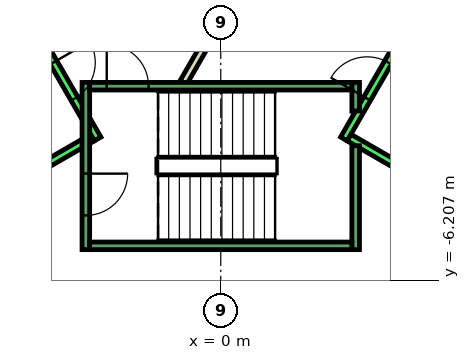
"""IFC4 building model, lengths in metres.
Left out: names, types, materials, properties, quantities, classifications, styles, units other than length and angle.
Written with IfcOpenShell. Run it as: python <this file> out.ifc"""

import sys

from ifc_helpers import new_model, si_unit, direction, frame, frame_2d, origin, place, context, subcontext, project, spatial, rectangle, extrude, element, fill, save


model = new_model("IFC4")
c1 = context("Model", 3, precision=1e-05, world=origin(), true_north=direction((0.0, 1.0)))
c2 = subcontext(c1, "Body", "Model", "MODEL_VIEW")
j1 = project(units=[si_unit("LENGTHUNIT", "METRE"), si_unit("PLANEANGLEUNIT", "RADIAN")], contexts=[c1])
p1 = place(None, origin())
s1 = spatial("IfcSite", under=j1, at=p1, CompositionType="ELEMENT")
p2 = place(p1, origin())
s2 = spatial("IfcBuilding", under=s1, at=p2, CompositionType="ELEMENT")
p3 = place(p2, frame((0.0, 0.0, 223.4)))
s3 = spatial("IfcBuildingStorey", under=s2, at=p3, CompositionType="ELEMENT", Elevation=223.4)
p4 = place(p3, frame((-0.982, -1.0, 0.0), z_axis=(0.0, 0.0, 1.0), x_axis=(0.50024047865, 0.865886518847, 0.0)))
e1 = element("IfcWall", 1, at=p4, inside=s3, PredefinedType="PARTITIONING", context=c2, shape_type="SweptSolid", body=[
    extrude(rectangle(XDim=1.863, YDim=0.2, at=frame_2d((0.931, 0.0))), origin(), (0.0, 0.0, 1.0), 3.8),
])
p5 = place(p3, frame((-5.94, 2.188, 0.0), z_axis=(0.0, 0.0, 1.0), x_axis=(0.500034260056, -0.866005622828, 0.0)))
e2 = element("IfcWall", 2, at=p5, inside=s3, PredefinedType="STANDARD", context=c2, shape_type="SweptSolid", body=[
    extrude(rectangle(XDim=5.399, YDim=0.2, at=frame_2d((2.7, 0.0))), origin(), (0.0, 0.0, 1.0), 3.8),
])
p6 = place(p5, frame((3.075, 0.0, 0.0)))
e3 = element("IfcOpeningElement", 3, at=p6, cuts=e2, PredefinedType="OPENING", context=c2, shape_type="SweptSolid", body=[
    extrude(rectangle(XDim=1.1, YDim=2.1, at=frame_2d((0.55, 1.05))), frame((0.0, 0.11, 0.0), z_axis=(0.0, -1.0, 0.0), x_axis=(1.0, 0.0, 0.0)), (0.0, 0.0, 1.0), 0.22),
])
p7 = place(p5, frame((1.225, 0.0, 0.0)))
e4 = element("IfcOpeningElement", 4, at=p7, cuts=e2, PredefinedType="OPENING", context=c2, shape_type="SweptSolid", body=[
    extrude(rectangle(XDim=1.1, YDim=2.1, at=frame_2d((0.55, 1.05))), frame((0.0, 0.11, 0.0), z_axis=(0.0, -1.0, 0.0), x_axis=(1.0, 0.0, 0.0)), (0.0, 0.0, 1.0), 0.22),
])
p8 = place(p3, frame((-3.377, -2.452, 0.0), z_axis=(0.0, 0.0, 1.0), x_axis=(-0.865955154139, -0.50012165622, 0.0)))
e5 = element("IfcWall", 5, at=p8, inside=s3, PredefinedType="STANDARD", context=c2, shape_type="SweptSolid", body=[
    extrude(rectangle(XDim=2.4, YDim=0.2, at=frame_2d((1.2, 0.0))), origin(), (0.0, 0.0, 1.0), 3.8),
])
p9 = place(p3, frame((3.24, -2.488, 0.0), z_axis=(0.0, 0.0, 1.0), x_axis=(0.500034260056, 0.866005622828, 0.0)))
e6 = element("IfcWall", 6, at=p9, inside=s3, PredefinedType="STANDARD", context=c2, shape_type="SweptSolid", body=[
    extrude(rectangle(XDim=5.399, YDim=0.2, at=frame_2d((2.7, 0.0))), origin(), (0.0, 0.0, 1.0), 3.8),
])
p10 = place(p9, frame((3.225, 0.0, 0.0)))
e7 = element("IfcOpeningElement", 7, at=p10, cuts=e6, PredefinedType="OPENING", context=c2, shape_type="SweptSolid", body=[
    extrude(rectangle(XDim=1.1, YDim=2.1, at=frame_2d((0.55, 1.05))), frame((0.0, 0.11, 0.0), z_axis=(0.0, -1.0, 0.0), x_axis=(1.0, 0.0, 0.0)), (0.0, 0.0, 1.0), 0.22),
])
p11 = place(p9, frame((1.225, 0.0, 0.0)))
e8 = element("IfcOpeningElement", 8, at=p11, cuts=e6, PredefinedType="OPENING", context=c2, shape_type="SweptSolid", body=[
    extrude(rectangle(XDim=1.1, YDim=2.1, at=frame_2d((0.55, 1.05))), frame((0.0, 0.11, 0.0), z_axis=(0.0, -1.0, 0.0), x_axis=(1.0, 0.0, 0.0)), (0.0, 0.0, 1.0), 0.22),
])
p12 = place(p3, frame((3.377, -2.452, 0.0), z_axis=(0.0, 0.0, 1.0), x_axis=(0.865955154139, -0.50012165622, 0.0)))
e9 = element("IfcWall", 9, at=p12, inside=s3, PredefinedType="STANDARD", context=c2, shape_type="SweptSolid", body=[
    extrude(rectangle(XDim=2.4, YDim=0.2, at=frame_2d((1.2, 0.0))), origin(), (0.0, 0.0, 1.0), 3.8),
])
p13 = place(p3, frame((-3.55, -1.0, 0.0), z_axis=(0.0, 0.0, 1.0), x_axis=(0.0, -1.0, 0.0)))
e10 = element("IfcWall", 10, at=p13, inside=s3, PredefinedType="STANDARD", context=c2, shape_type="SweptSolid", body=[
    extrude(rectangle(XDim=4.4, YDim=0.2, at=frame_2d((2.2, 0.0))), origin(), (0.0, 0.0, 1.0), 3.8),
])
p14 = place(p13, frame((2.4, 0.0, 0.0)))
e11 = element("IfcOpeningElement", 11, at=p14, cuts=e10, PredefinedType="OPENING", context=c2, shape_type="SweptSolid", body=[
    extrude(rectangle(XDim=1.1, YDim=2.2, at=frame_2d((0.55, 1.1))), frame((0.0, 0.11, 0.0), z_axis=(0.0, -1.0, 0.0), x_axis=(1.0, 0.0, 0.0)), (0.0, 0.0, 1.0), 0.22),
])
p15 = place(p3, frame((3.55, -2.667, 0.0), z_axis=(0.0, 0.0, 1.0), x_axis=(0.0, -1.0, 0.0)))
e12 = element("IfcWall", 12, at=p15, inside=s3, PredefinedType="STANDARD", context=c2, shape_type="SweptSolid", body=[
    extrude(rectangle(XDim=2.733, YDim=0.2, at=frame_2d((1.366, 0.0))), origin(), (0.0, 0.0, 1.0), 3.8),
])
p16 = place(p3, frame((3.55, -1.0, 0.0), z_axis=(0.0, 0.0, 1.0), x_axis=(0.0, -1.0, 0.0)))
e13 = element("IfcWall", 13, at=p16, inside=s3, PredefinedType="STANDARD", context=c2, shape_type="SweptSolid", body=[
    extrude(rectangle(XDim=0.751, YDim=0.2, at=frame_2d((0.375, 0.0))), origin(), (0.0, 0.0, 1.0), 3.8),
])
p17 = place(p3, frame((-3.45, -1.1, 0.0), z_axis=(0.0, 0.0, 1.0), x_axis=(1.0, 0.0, 0.0)))
e14 = element("IfcWall", 14, at=p17, inside=s3, PredefinedType="STANDARD", context=c2, shape_type="SweptSolid", body=[
    extrude(rectangle(XDim=6.9, YDim=0.2, at=frame_2d((3.45, 0.0))), origin(), (0.0, 0.0, 1.0), 3.8),
])
p18 = place(p17, frame((0.45, 0.0, 0.0)))
e15 = element("IfcOpeningElement", 15, at=p18, cuts=e14, PredefinedType="OPENING", context=c2, shape_type="SweptSolid", body=[
    extrude(rectangle(XDim=1.1, YDim=2.2, at=frame_2d((0.55, 1.1))), frame((0.0, 0.11, 0.0), z_axis=(0.0, -1.0, 0.0), x_axis=(1.0, 0.0, 0.0)), (0.0, 0.0, 1.0), 0.22),
])
p19 = place(p3, frame((-3.45, -5.3, 0.0), z_axis=(0.0, 0.0, 1.0), x_axis=(1.0, 0.0, 0.0)))
e16 = element("IfcWall", 16, at=p19, inside=s3, PredefinedType="STANDARD", context=c2, shape_type="SweptSolid", body=[
    extrude(rectangle(XDim=6.9, YDim=0.2, at=frame_2d((3.45, 0.0))), origin(), (0.0, 0.0, 1.0), 3.8),
])
p20 = place(p6, origin())
e17 = element("IfcDoor", 17, at=p20, inside=s3, OperationType="SLIDING_TO_LEFT", PredefinedType="DOOR", context=c2, shape_type="SweptSolid", body=[
    extrude(rectangle(XDim=1.1, YDim=2.1, at=frame_2d((0.55, 1.05))), frame((0.0, 0.025, 0.0), z_axis=(0.0, -1.0, 0.0), x_axis=(1.0, 0.0, 0.0)), (0.0, 0.0, 1.0), 0.05),
])
fill(e3, e17)
p21 = place(p11, origin())
e18 = element("IfcDoor", 18, at=p21, inside=s3, OperationType="SLIDING_TO_LEFT", PredefinedType="DOOR", context=c2, shape_type="SweptSolid", body=[
    extrude(rectangle(XDim=1.1, YDim=2.1, at=frame_2d((0.55, 1.05))), frame((0.0, 0.025, 0.0), z_axis=(0.0, -1.0, 0.0), x_axis=(1.0, 0.0, 0.0)), (0.0, 0.0, 1.0), 0.05),
])
fill(e8, e18)
p22 = place(p18, origin())
e19 = element("IfcDoor", 19, at=p22, inside=s3, OperationType="SINGLE_SWING_LEFT", PredefinedType="DOOR", context=c2, shape_type="SweptSolid", body=[
    extrude(rectangle(XDim=1.1, YDim=2.2, at=frame_2d((0.55, 1.1))), frame((0.0, 0.025, 0.0), z_axis=(0.0, -1.0, 0.0), x_axis=(1.0, 0.0, 0.0)), (0.0, 0.0, 1.0), 0.05),
])
fill(e15, e19)
p23 = place(p14, origin())
e20 = element("IfcDoor", 20, at=p23, inside=s3, OperationType="SINGLE_SWING_LEFT", PredefinedType="DOOR", context=c2, shape_type="SweptSolid", body=[
    extrude(rectangle(XDim=1.1, YDim=2.2, at=frame_2d((0.55, 1.1))), frame((0.0, 0.025, 0.0), z_axis=(0.0, -1.0, 0.0), x_axis=(1.0, 0.0, 0.0)), (0.0, 0.0, 1.0), 0.05),
])
fill(e11, e20)
save(model, sys.argv[1])
